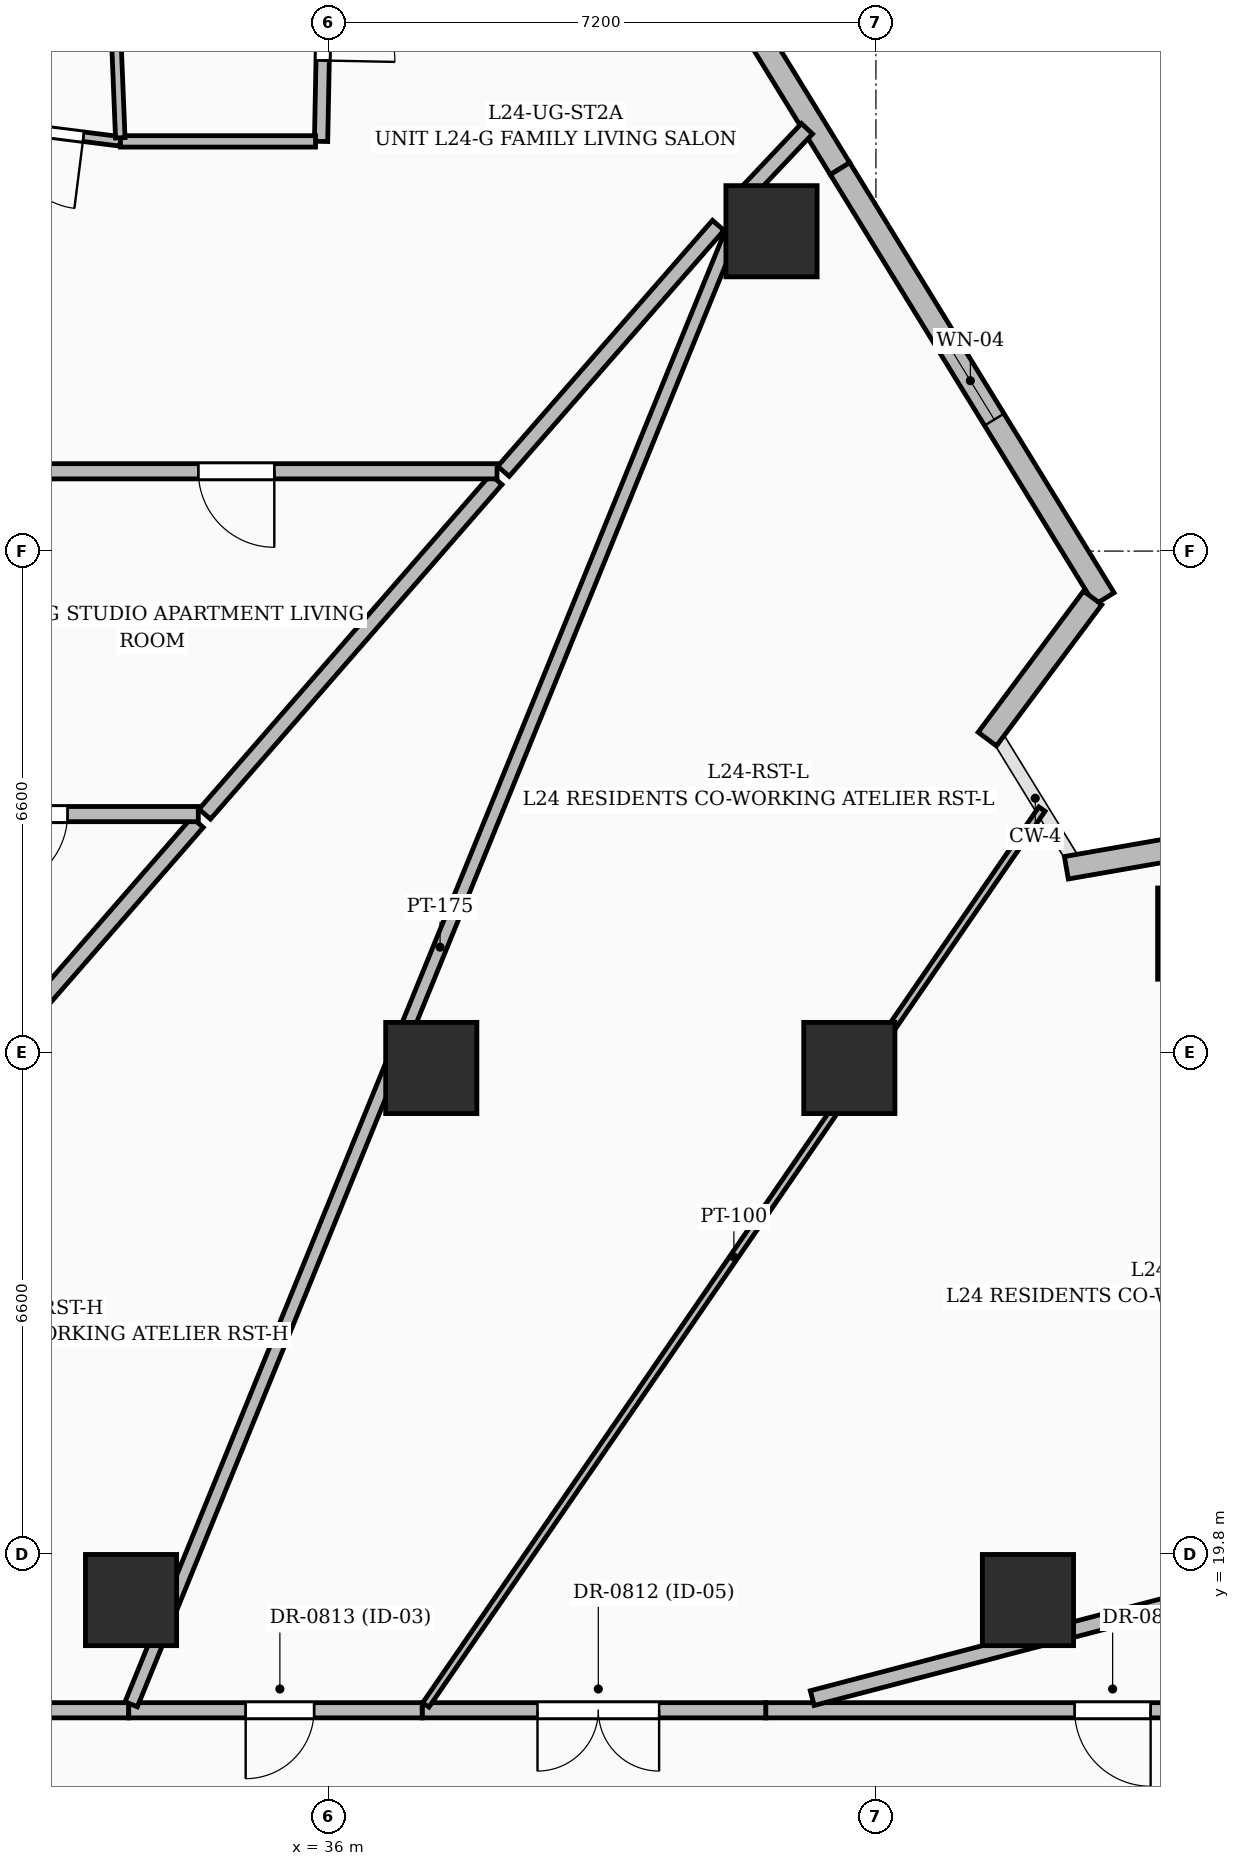
"""IFC4 building model, lengths in metres.
Left out: names, types, materials, properties, quantities, classifications, styles, units other than length and angle.
Written with IfcOpenShell. Run it as: python <this file> out.ifc"""

import sys

from ifc_helpers import new_model, si_unit, direction, frame, frame_2d, origin, origin_2d, place, context, subcontext, project, spatial, rectangle, extrude, element, fill, save


model = new_model("IFC4")
c1 = context("Model", 3, precision=1e-05, world=origin(), true_north=direction((0.0, 1.0)))
c2 = subcontext(c1, "Body", "Model", "MODEL_VIEW")
j1 = project(units=[si_unit("LENGTHUNIT", "METRE"), si_unit("PLANEANGLEUNIT", "RADIAN")], contexts=[c1])
p1 = place(None, origin())
s1 = spatial("IfcSite", under=j1, at=p1, CompositionType="ELEMENT")
p2 = place(p1, origin())
s2 = spatial("IfcBuilding", under=s1, at=p2, CompositionType="ELEMENT")
p3 = place(p2, frame((0.0, 0.0, 96.6)))
s3 = spatial("IfcBuildingStorey", under=s2, at=p3, CompositionType="ELEMENT", Elevation=96.6)
for number, where, z_axis, x_axis in (
    (1, (45.2, 19.2, 0.0), (0.0, 0.0, 1.0), (1.0, 0.0, 0.0)),
    (2, (42.85, 26.2, 0.0), (0.0, 0.0, 1.0), (1.0, 0.0, 0.0)),
    (3, (37.35, 26.2, 0.0), (0.0, 0.0, 1.0), (1.0, 0.0, 0.0)),
    (4, (33.4, 19.2, 0.0), (0.0, 0.0, 1.0), (1.0, 0.0, 0.0)),
    (5, (47.506, 27.968, 0.0), (0.0, 0.0, 1.0), (1.0, 0.0, 0.0)),
    (6, (41.826, 37.208, 0.0), (0.0, 0.0, 1.0), (1.0, 0.0, 0.0)),
):
    element("IfcColumn", number, at=place(p3, frame(where, z_axis=z_axis, x_axis=x_axis)), inside=s3, PredefinedType="COLUMN", context=c2, shape_type="SweptSolid", body=[
        extrude(rectangle(XDim=1.2, YDim=1.2, at=origin_2d()), origin(), (0.0, 0.0, 1.0), 3.6),
    ])
p4 = place(p3, frame((30.131, 37.903, 0.0), z_axis=(0.0, 0.0, 1.0), x_axis=(0.539468344174, 0.842005882185, 0.0)))
e7 = element("IfcWall", 7, at=p4, inside=s3, PredefinedType="SOLIDWALL", context=c2, shape_type="SweptSolid", body=[
    extrude(rectangle(XDim=6.933, YDim=0.3, at=frame_2d((3.466, 0.0))), origin(), (0.0, 0.0, 1.0), 3.3),
])
p5 = place(p4, frame((2.3, 0.0, 0.8)))
e8 = element("IfcOpeningElement", 8, at=p5, cuts=e7, PredefinedType="OPENING", context=c2, shape_type="SweptSolid", body=[
    extrude(rectangle(XDim=1.2, YDim=1.8, at=frame_2d((0.6, 0.9))), frame((0.0, 0.16, 0.0), z_axis=(0.0, -1.0, 0.0), x_axis=(1.0, 0.0, 0.0)), (0.0, 0.0, 1.0), 0.32),
])
p6 = place(p3, frame((39.546, 43.208, 0.0), z_axis=(0.0, 0.0, 1.0), x_axis=(0.523660209905, -0.851927217879, 0.0)))
e9 = element("IfcWall", 9, at=p6, inside=s3, PredefinedType="SOLIDWALL", context=c2, shape_type="SweptSolid", body=[
    extrude(rectangle(XDim=6.076, YDim=0.3, at=frame_2d((3.038, 0.0))), origin(), (0.0, 0.0, 1.0), 3.3),
])
p7 = place(p6, frame((2.46, 0.0, 0.6)))
e10 = element("IfcOpeningElement", 10, at=p7, cuts=e9, PredefinedType="OPENING", context=c2, shape_type="SweptSolid", body=[
    extrude(rectangle(XDim=1.5, YDim=2.1, at=frame_2d((0.75, 1.05))), frame((0.0, 0.16, 0.0), z_axis=(0.0, -1.0, 0.0), x_axis=(1.0, 0.0, 0.0)), (0.0, 0.0, 1.0), 0.32),
])
p8 = place(p3, frame((42.728, 38.031, 0.0), z_axis=(0.0, 0.0, 1.0), x_axis=(0.523672784649, -0.851919488343, 0.0)))
e11 = element("IfcWall", 11, at=p8, inside=s3, PredefinedType="SOLIDWALL", context=c2, shape_type="SweptSolid", body=[
    extrude(rectangle(XDim=6.641, YDim=0.3, at=frame_2d((3.321, 0.0))), origin(), (0.0, 0.0, 1.0), 3.3),
])
p9 = place(p8, frame((2.675, 0.0, 0.8)))
e12 = element("IfcOpeningElement", 12, at=p9, cuts=e11, PredefinedType="OPENING", context=c2, shape_type="SweptSolid", body=[
    extrude(rectangle(XDim=1.2, YDim=1.8, at=frame_2d((0.6, 0.9))), frame((0.0, 0.16, 0.0), z_axis=(0.0, -1.0, 0.0), x_axis=(1.0, 0.0, 0.0)), (0.0, 0.0, 1.0), 0.32),
])
p10 = place(p3, frame((46.051, 32.385, 0.0), z_axis=(0.0, 0.0, 1.0), x_axis=(-0.597942033265, -0.801539347041, 0.0)))
e13 = element("IfcWall", 13, at=p10, inside=s3, PredefinedType="SOLIDWALL", context=c2, shape_type="SweptSolid", body=[
    extrude(rectangle(XDim=2.318, YDim=0.3, at=frame_2d((1.159, 0.0))), origin(), (0.0, 0.0, 1.0), 2.325),
])
p11 = place(p3, frame((45.705, 28.834, 0.0), z_axis=(0.0, 0.0, 1.0), x_axis=(0.985100314999, 0.171980723889, 0.0)))
e14 = element("IfcWall", 14, at=p11, inside=s3, PredefinedType="SOLIDWALL", context=c2, shape_type="SweptSolid", body=[
    extrude(rectangle(XDim=2.594, YDim=0.3, at=frame_2d((1.297, 0.0))), origin(), (0.0, 0.0, 1.0), 2.325),
])
p12 = place(p3, frame((48.415, 17.75, 0.0), z_axis=(0.0, 0.0, 1.0), x_axis=(-1.0, 0.0, 0.0)))
e15 = element("IfcWall", 15, at=p12, inside=s3, PredefinedType="PARTITIONING", context=c2, shape_type="SweptSolid", body=[
    extrude(rectangle(XDim=6.665, YDim=0.2, at=frame_2d((3.333, 0.0))), origin(), (0.0, 0.0, 1.0), 2.259),
])
p13 = place(p12, frame((1.601, 0.0, 0.0)))
e16 = element("IfcOpeningElement", 16, at=p13, cuts=e15, PredefinedType="OPENING", context=c2, shape_type="SweptSolid", body=[
    extrude(rectangle(XDim=1.0, YDim=2.2, at=frame_2d((0.5, 1.1))), frame((0.0, 0.11, 0.0), z_axis=(0.0, -1.0, 0.0), x_axis=(1.0, 0.0, 0.0)), (0.0, 0.0, 1.0), 0.22),
])
p14 = place(p3, frame((33.37, 17.75, 0.0), z_axis=(0.0, 0.0, 1.0), x_axis=(-1.0, 0.0, 0.0)))
e17 = element("IfcWall", 17, at=p14, inside=s3, PredefinedType="PARTITIONING", context=c2, shape_type="SweptSolid", body=[
    extrude(rectangle(XDim=9.135, YDim=0.2, at=frame_2d((4.567, 0.0))), origin(), (0.0, 0.0, 1.0), 2.295),
])
p15 = place(p14, frame((4.19, 0.0, 0.0)))
e18 = element("IfcOpeningElement", 18, at=p15, cuts=e17, PredefinedType="OPENING", context=c2, shape_type="SweptSolid", body=[
    extrude(rectangle(XDim=0.9, YDim=2.1, at=frame_2d((0.45, 1.05))), frame((0.0, 0.11, 0.0), z_axis=(0.0, -1.0, 0.0), x_axis=(1.0, 0.0, 0.0)), (0.0, 0.0, 1.0), 0.22),
])
p16 = place(p3, frame((41.75, 17.75, 0.0), z_axis=(0.0, 0.0, 1.0), x_axis=(-1.0, 0.0, 0.0)))
e19 = element("IfcWall", 19, at=p16, inside=s3, PredefinedType="PARTITIONING", context=c2, shape_type="SweptSolid", body=[
    extrude(rectangle(XDim=4.52, YDim=0.2, at=frame_2d((2.26, 0.0))), origin(), (0.0, 0.0, 1.0), 3.3),
])
p17 = place(p16, frame((1.403, 0.0, 0.0)))
e20 = element("IfcOpeningElement", 20, at=p17, cuts=e19, PredefinedType="OPENING", context=c2, shape_type="SweptSolid", body=[
    extrude(rectangle(XDim=1.6, YDim=2.3, at=frame_2d((0.8, 1.15))), frame((0.0, 0.11, 0.0), z_axis=(0.0, -1.0, 0.0), x_axis=(1.0, 0.0, 0.0)), (0.0, 0.0, 1.0), 0.22),
])
p18 = place(p3, frame((37.23, 17.75, 0.0), z_axis=(0.0, 0.0, 1.0), x_axis=(-1.0, 0.0, 0.0)))
e21 = element("IfcWall", 21, at=p18, inside=s3, PredefinedType="PARTITIONING", context=c2, shape_type="SweptSolid", body=[
    extrude(rectangle(XDim=3.86, YDim=0.2, at=frame_2d((1.93, 0.0))), origin(), (0.0, 0.0, 1.0), 2.259),
])
p19 = place(p18, frame((1.422, 0.0, 0.0)))
e22 = element("IfcOpeningElement", 22, at=p19, cuts=e21, PredefinedType="OPENING", context=c2, shape_type="SweptSolid", body=[
    extrude(rectangle(XDim=0.9, YDim=2.1, at=frame_2d((0.45, 1.05))), frame((0.0, 0.11, 0.0), z_axis=(0.0, -1.0, 0.0), x_axis=(1.0, 0.0, 0.0)), (0.0, 0.0, 1.0), 0.22),
])
p20 = place(p3, frame((53.235, 20.761, 0.0), z_axis=(0.0, 0.0, 1.0), x_axis=(-0.967298670581, -0.253640063657, 0.0)))
e23 = element("IfcWall", 23, at=p20, inside=s3, PredefinedType="PARTITIONING", context=c2, shape_type="SweptSolid", body=[
    extrude(rectangle(XDim=11.241, YDim=0.2, at=frame_2d((5.62, 0.0))), origin(), (0.0, 0.0, 1.0), 2.259),
])
p21 = place(p3, frame((29.791, 24.286, 0.0), z_axis=(0.0, 0.0, 1.0), x_axis=(0.656986124128, 0.753902667924, 0.0)))
e24 = element("IfcWall", 24, at=p21, inside=s3, PredefinedType="PARTITIONING", context=c2, shape_type="SweptSolid", body=[
    extrude(rectangle(XDim=6.824, YDim=0.2, at=frame_2d((3.412, 0.0))), origin(), (0.0, 0.0, 1.0), 2.81),
])
p22 = place(p3, frame((34.285, 29.54, 0.0), z_axis=(0.0, 0.0, 1.0), x_axis=(-1.0, 0.0, 0.0)))
e25 = element("IfcWall", 25, at=p22, inside=s3, PredefinedType="PARTITIONING", context=c2, shape_type="SweptSolid", body=[
    extrude(rectangle(XDim=4.525, YDim=0.2, at=frame_2d((2.262, 0.0))), origin(), (0.0, 0.0, 1.0), 2.81),
])
p23 = place(p22, frame((1.72, 0.0, 0.0)))
e26 = element("IfcOpeningElement", 26, at=p23, cuts=e25, PredefinedType="OPENING", context=c2, shape_type="SweptSolid", body=[
    extrude(rectangle(XDim=1.0, YDim=2.2, at=frame_2d((0.5, 1.1))), frame((0.0, 0.11, 0.0), z_axis=(0.0, -1.0, 0.0), x_axis=(1.0, 0.0, 0.0)), (0.0, 0.0, 1.0), 0.22),
])
p24 = place(p3, frame((38.205, 33.941, 0.0), z_axis=(0.0, 0.0, 1.0), x_axis=(-0.656942619395, -0.753940577779, 0.0)))
e27 = element("IfcWall", 27, at=p24, inside=s3, PredefinedType="PARTITIONING", context=c2, shape_type="SweptSolid", body=[
    extrude(rectangle(XDim=5.837, YDim=0.2, at=frame_2d((2.918, 0.0))), origin(), (0.0, 0.0, 1.0), 2.295),
])
p25 = place(p3, frame((33.402, 17.829, 0.0), z_axis=(0.0, 0.0, 1.0), x_axis=(0.377767569575, 0.925900460837, 0.0)))
e28 = element("IfcWall", 28, at=p25, inside=s3, PredefinedType="PARTITIONING", context=c2, shape_type="SweptSolid", body=[
    extrude(rectangle(XDim=21.516, YDim=0.175, at=frame_2d((10.758, 0.0))), origin(), (0.0, 0.0, 1.0), 2.259),
])
p26 = place(p3, frame((41.125, 37.285, 0.0), z_axis=(0.0, 0.0, 1.0), x_axis=(-0.657650992125, -0.753322754572, 0.0)))
e29 = element("IfcWall", 29, at=p26, inside=s3, PredefinedType="PARTITIONING", context=c2, shape_type="SweptSolid", body=[
    extrude(rectangle(XDim=4.295, YDim=0.2, at=frame_2d((2.147, 0.0))), origin(), (0.0, 0.0, 1.0), 2.32),
])
p27 = place(p3, frame((45.384, 29.606, 0.0), z_axis=(0.0, 0.0, 1.0), x_axis=(-0.566667167999, -0.823946794831, 0.0)))
e30 = element("IfcWall", 30, at=p27, inside=s3, PredefinedType="PARTITIONING", context=c2, shape_type="SweptSolid", body=[
    extrude(rectangle(XDim=14.304, YDim=0.1, at=frame_2d((7.152, 0.0))), origin(), (0.0, 0.0, 1.0), 2.81),
])
p28 = place(p3, frame((38.215, 34.05, 0.0), z_axis=(0.0, 0.0, 1.0), x_axis=(-1.0, 0.0, 0.0)))
e31 = element("IfcWall", 31, at=p28, inside=s3, PredefinedType="PARTITIONING", context=c2, shape_type="SweptSolid", body=[
    extrude(rectangle(XDim=7.065, YDim=0.2, at=frame_2d((3.533, 0.0))), origin(), (0.0, 0.0, 1.0), 2.295),
])
p29 = place(p28, frame((2.93, 0.0, 0.0)))
e32 = element("IfcOpeningElement", 32, at=p29, cuts=e31, PredefinedType="OPENING", context=c2, shape_type="SweptSolid", body=[
    extrude(rectangle(XDim=1.0, YDim=2.2, at=frame_2d((0.5, 1.1))), frame((0.0, 0.11, 0.0), z_axis=(0.0, -1.0, 0.0), x_axis=(1.0, 0.0, 0.0)), (0.0, 0.0, 1.0), 0.22),
])
p30 = place(p3, frame((42.293, 38.557, 0.0), z_axis=(0.0, 0.0, 1.0), x_axis=(-0.687043041617, -0.726616720814, 0.0)))
e33 = element("IfcWall", 33, at=p30, inside=s3, PredefinedType="PARTITIONING", context=c2, shape_type="SweptSolid", body=[
    extrude(rectangle(XDim=1.11, YDim=0.2, at=frame_2d((0.555, 0.0))), origin(), (0.0, 0.0, 1.0), 3.3),
])
p31 = place(p3, frame((33.26, 38.39, 0.0), z_axis=(0.0, 0.0, 1.0), x_axis=(-0.992108113315, 0.125385371932, 0.0)))
e34 = element("IfcWall", 34, at=p31, inside=s3, PredefinedType="PARTITIONING", context=c2, shape_type="SweptSolid", body=[
    extrude(rectangle(XDim=2.514, YDim=0.125, at=frame_2d((1.257, 0.0))), origin(), (0.0, 0.0, 1.0), 3.3),
])
p32 = place(p31, frame((0.49, 0.0, 0.0)))
e35 = element("IfcOpeningElement", 35, at=p32, cuts=e34, PredefinedType="OPENING", context=c2, shape_type="SweptSolid", body=[
    extrude(rectangle(XDim=0.95, YDim=2.2, at=frame_2d((0.475, 1.1))), frame((0.0, 0.072, 0.0), z_axis=(0.0, -1.0, 0.0), x_axis=(1.0, 0.0, 0.0)), (0.0, 0.0, 1.0), 0.145),
])
p33 = place(p3, frame((35.959, 41.371, 0.0), z_axis=(0.0, 0.0, 1.0), x_axis=(-0.019814305947, -0.999803677369, 0.0)))
e36 = element("IfcWall", 36, at=p33, inside=s3, PredefinedType="PARTITIONING", context=c2, shape_type="SweptSolid", body=[
    extrude(rectangle(XDim=2.982, YDim=0.175, at=frame_2d((1.491, 0.0))), origin(), (0.0, 0.0, 1.0), 3.3),
])
p34 = place(p33, frame((0.967, 0.0, 0.0)))
e37 = element("IfcOpeningElement", 37, at=p34, cuts=e36, PredefinedType="OPENING", context=c2, shape_type="SweptSolid", body=[
    extrude(rectangle(XDim=0.95, YDim=2.2, at=frame_2d((0.475, 1.1))), frame((0.0, 0.097, 0.0), z_axis=(0.0, -1.0, 0.0), x_axis=(1.0, 0.0, 0.0)), (0.0, 0.0, 1.0), 0.195),
])
p35 = place(p3, frame((35.827, 38.39, 0.0), z_axis=(0.0, 0.0, 1.0), x_axis=(-1.0, 0.0, 0.0)))
e38 = element("IfcWall", 38, at=p35, inside=s3, PredefinedType="PARTITIONING", context=c2, shape_type="SweptSolid", body=[
    extrude(rectangle(XDim=2.567, YDim=0.15, at=frame_2d((1.284, 0.0))), origin(), (0.0, 0.0, 1.0), 3.3),
])
p36 = place(p3, frame((33.259, 38.438, 0.0), z_axis=(0.0, 0.0, 1.0), x_axis=(-0.040786210749, 0.999167896308, 0.0)))
e39 = element("IfcWall", 39, at=p36, inside=s3, PredefinedType="PARTITIONING", context=c2, shape_type="SweptSolid", body=[
    extrude(rectangle(XDim=3.885, YDim=0.125, at=frame_2d((1.942, 0.0))), origin(), (0.0, 0.0, 1.0), 3.3),
])
p37 = place(p9, origin())
e40 = element("IfcWindow", 40, at=p37, inside=s3, PartitioningType="SINGLE_PANEL", PredefinedType="WINDOW", context=c2, shape_type="SweptSolid", body=[
    extrude(rectangle(XDim=1.2, YDim=1.8, at=frame_2d((0.6, 0.9))), frame((0.0, 0.03, 0.0), z_axis=(0.0, -1.0, 0.0), x_axis=(1.0, 0.0, 0.0)), (0.0, 0.0, 1.0), 0.06),
])
fill(e12, e40)
p38 = place(p17, origin())
e41 = element("IfcDoor", 41, at=p38, inside=s3, OperationType="DOUBLE_DOOR_SINGLE_SWING", PredefinedType="DOOR", context=c2, shape_type="SweptSolid", body=[
    extrude(rectangle(XDim=1.6, YDim=2.3, at=frame_2d((0.8, 1.15))), frame((0.0, 0.025, 0.0), z_axis=(0.0, -1.0, 0.0), x_axis=(1.0, 0.0, 0.0)), (0.0, 0.0, 1.0), 0.05),
])
fill(e20, e41)
p39 = place(p19, origin())
e42 = element("IfcDoor", 42, at=p39, inside=s3, OperationType="SINGLE_SWING_RIGHT", PredefinedType="DOOR", context=c2, shape_type="SweptSolid", body=[
    extrude(rectangle(XDim=0.9, YDim=2.1, at=frame_2d((0.45, 1.05))), frame((0.0, 0.025, 0.0), z_axis=(0.0, -1.0, 0.0), x_axis=(1.0, 0.0, 0.0)), (0.0, 0.0, 1.0), 0.05),
])
fill(e22, e42)
p40 = place(p13, origin())
e43 = element("IfcDoor", 43, at=p40, inside=s3, OperationType="SINGLE_SWING_LEFT", PredefinedType="DOOR", context=c2, shape_type="SweptSolid", body=[
    extrude(rectangle(XDim=1.0, YDim=2.2, at=frame_2d((0.5, 1.1))), frame((0.0, 0.025, 0.0), z_axis=(0.0, -1.0, 0.0), x_axis=(1.0, 0.0, 0.0)), (0.0, 0.0, 1.0), 0.05),
])
fill(e16, e43)
p41 = place(p32, origin())
e44 = element("IfcDoor", 44, at=p41, inside=s3, OperationType="SINGLE_SWING_LEFT", PredefinedType="DOOR", context=c2, shape_type="SweptSolid", body=[
    extrude(rectangle(XDim=0.95, YDim=2.2, at=frame_2d((0.475, 1.1))), frame((0.0, 0.025, 0.0), z_axis=(0.0, -1.0, 0.0), x_axis=(1.0, 0.0, 0.0)), (0.0, 0.0, 1.0), 0.05),
])
fill(e35, e44)
p42 = place(p34, origin())
e45 = element("IfcDoor", 45, at=p42, inside=s3, OperationType="SINGLE_SWING_RIGHT", PredefinedType="DOOR", context=c2, shape_type="SweptSolid", body=[
    extrude(rectangle(XDim=0.95, YDim=2.2, at=frame_2d((0.475, 1.1))), frame((0.0, 0.025, 0.0), z_axis=(0.0, -1.0, 0.0), x_axis=(1.0, 0.0, 0.0)), (0.0, 0.0, 1.0), 0.05),
])
fill(e37, e45)
p43 = place(p23, origin())
e46 = element("IfcDoor", 46, at=p43, inside=s3, OperationType="SINGLE_SWING_RIGHT", PredefinedType="DOOR", context=c2, shape_type="SweptSolid", body=[
    extrude(rectangle(XDim=1.0, YDim=2.2, at=frame_2d((0.5, 1.1))), frame((0.0, 0.025, 0.0), z_axis=(0.0, -1.0, 0.0), x_axis=(1.0, 0.0, 0.0)), (0.0, 0.0, 1.0), 0.05),
])
fill(e26, e46)
p44 = place(p29, origin())
e47 = element("IfcDoor", 47, at=p44, inside=s3, OperationType="SINGLE_SWING_LEFT", PredefinedType="DOOR", context=c2, shape_type="SweptSolid", body=[
    extrude(rectangle(XDim=1.0, YDim=2.2, at=frame_2d((0.5, 1.1))), frame((0.0, 0.025, 0.0), z_axis=(0.0, -1.0, 0.0), x_axis=(1.0, 0.0, 0.0)), (0.0, 0.0, 1.0), 0.05),
])
fill(e32, e47)
save(model, sys.argv[1])
